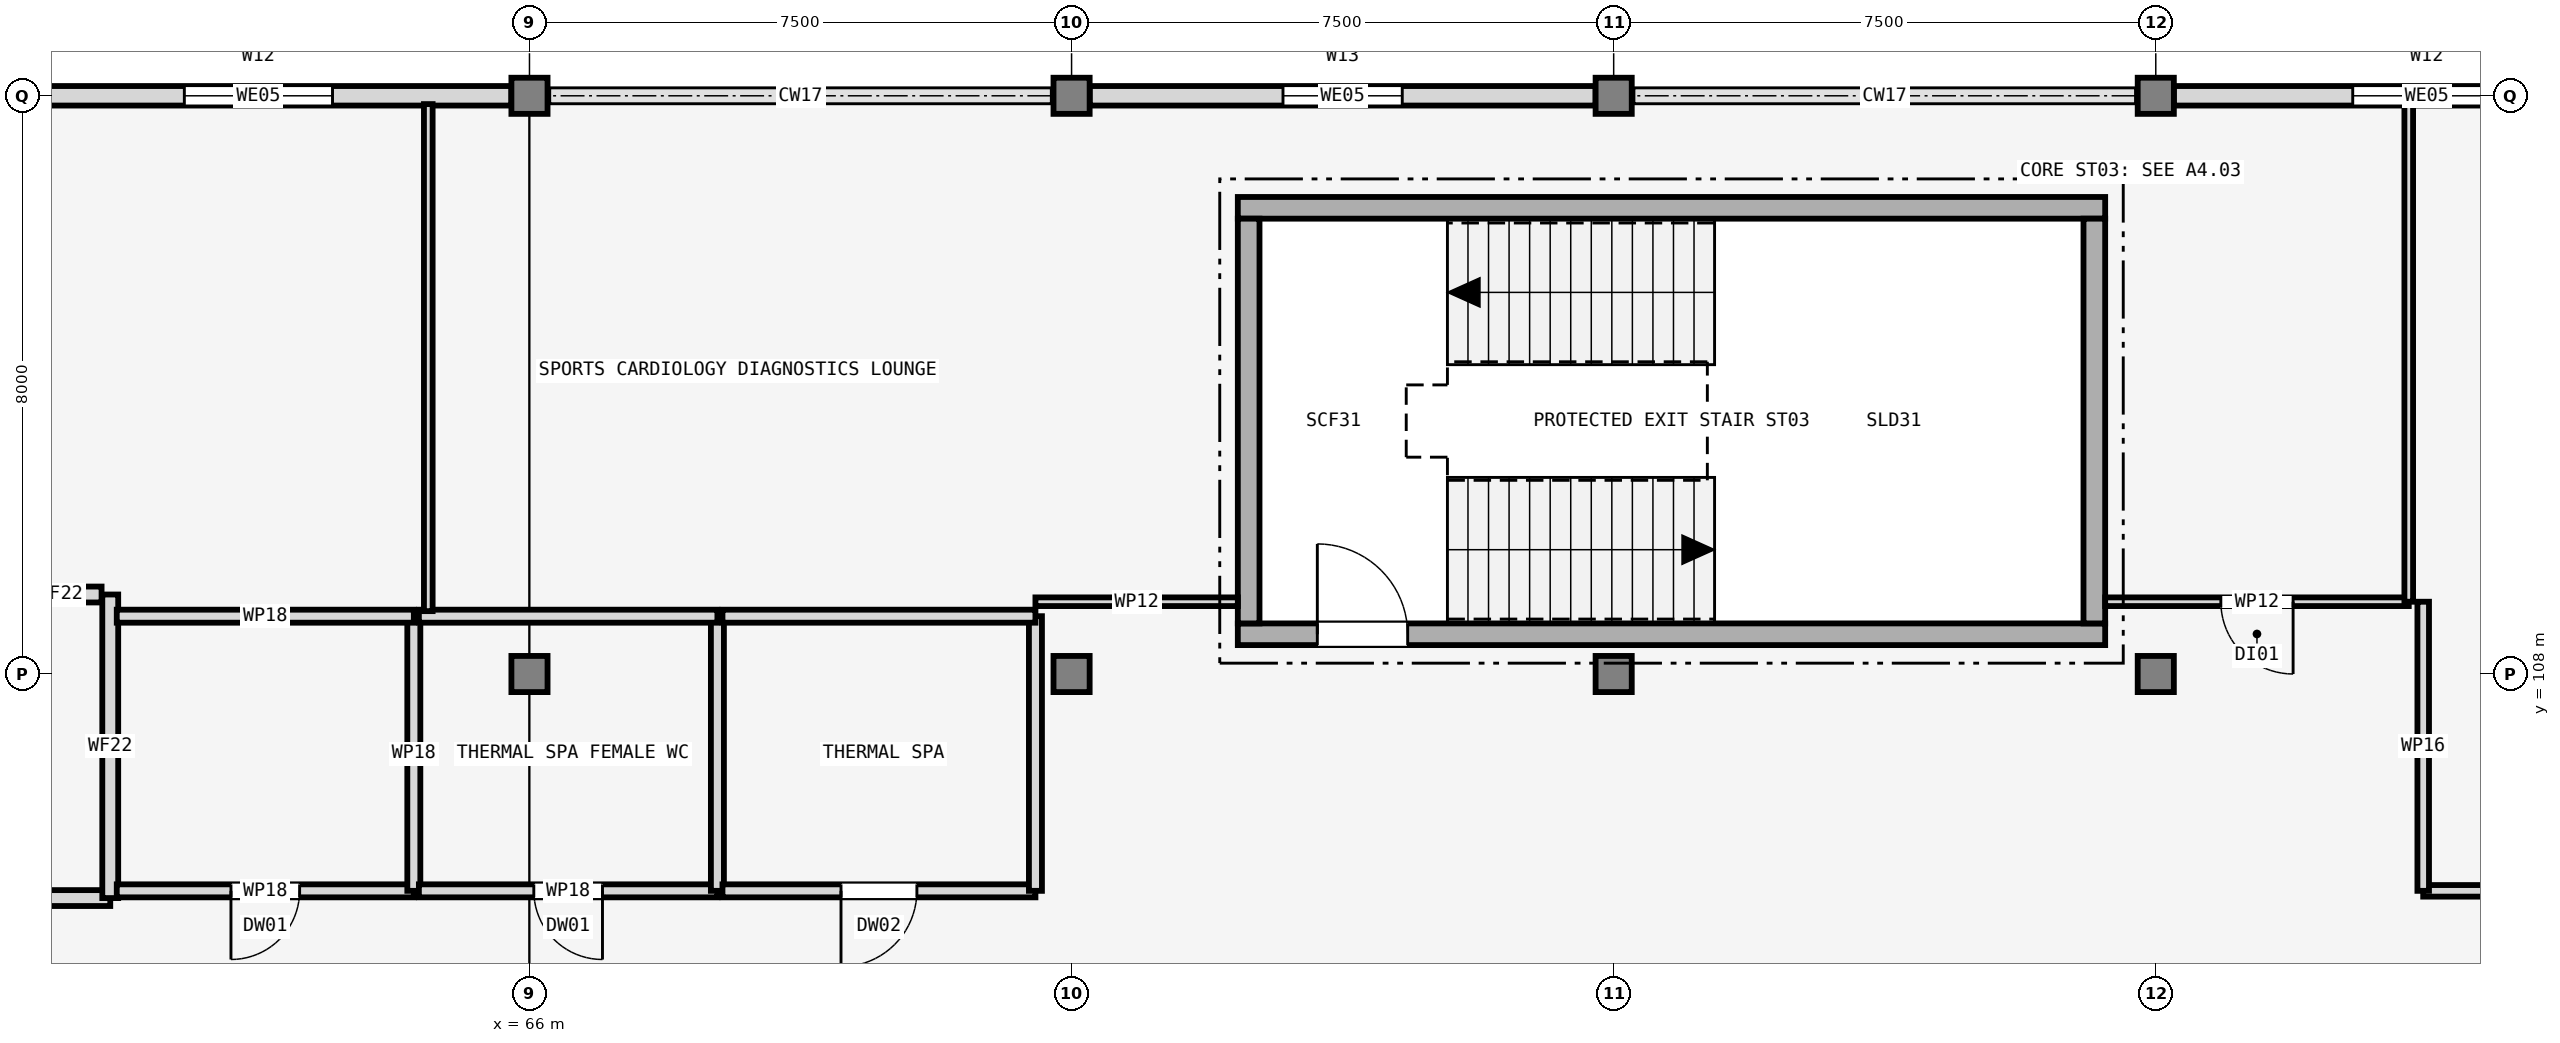
"""IFC4 building model, lengths in metres.
Left out: names, types, materials, properties, quantities, classifications, styles, units other than length and angle.
Written with IfcOpenShell. Run it as: python <this file> out.ifc"""

import sys

from ifc_helpers import new_model, si_unit, direction, frame, frame_2d, origin, origin_2d, place, context, subcontext, project, spatial, rectangle, extrude, element, fill, save


model = new_model("IFC4")
c1 = context("Model", 3, precision=1e-05, world=origin(), true_north=direction((0.0, 1.0)))
c2 = subcontext(c1, "Body", "Model", "MODEL_VIEW")
j1 = project(units=[si_unit("LENGTHUNIT", "METRE"), si_unit("PLANEANGLEUNIT", "RADIAN")], contexts=[c1])
p1 = place(None, origin())
s1 = spatial("IfcSite", under=j1, at=p1, CompositionType="ELEMENT")
p2 = place(p1, origin())
s2 = spatial("IfcBuilding", under=s1, at=p2, CompositionType="ELEMENT")
p3 = place(p2, frame((0.0, 0.0, 13.5)))
s3 = spatial("IfcBuildingStorey", under=s2, at=p3, CompositionType="ELEMENT", Elevation=13.5)
for number, where, z_axis, x_axis in (
    (1, (66.0, 108.0, 0.0), (0.0, 0.0, 1.0), (1.0, 0.0, 0.0)),
    (2, (66.0, 116.0, 0.0), (0.0, 0.0, 1.0), (1.0, 0.0, 0.0)),
    (3, (73.5, 108.0, 0.0), (0.0, 0.0, 1.0), (1.0, 0.0, 0.0)),
    (4, (73.5, 116.0, 0.0), (0.0, 0.0, 1.0), (1.0, 0.0, 0.0)),
    (5, (81.0, 108.0, 0.0), (0.0, 0.0, 1.0), (1.0, 0.0, 0.0)),
    (6, (81.0, 116.0, 0.0), (0.0, 0.0, 1.0), (1.0, 0.0, 0.0)),
    (7, (88.5, 108.0, 0.0), (0.0, 0.0, 1.0), (1.0, 0.0, 0.0)),
    (8, (88.5, 116.0, 0.0), (0.0, 0.0, 1.0), (1.0, 0.0, 0.0)),
):
    element("IfcColumn", number, at=place(p3, frame(where, z_axis=z_axis, x_axis=x_axis)), inside=s3, PredefinedType="COLUMN", context=c2, shape_type="SweptSolid", body=[
        extrude(rectangle(XDim=0.5, YDim=0.5, at=origin_2d()), origin(), (0.0, 0.0, 1.0), 4.2),
    ])
p4 = place(p3, frame((65.75, 116.0, 0.0), z_axis=(0.0, 0.0, 1.0), x_axis=(-1.0, 0.0, 0.0)))
e9 = element("IfcWall", 9, at=p4, inside=s3, PredefinedType="SOLIDWALL", context=c2, shape_type="SweptSolid", body=[
    extrude(rectangle(XDim=7.0, YDim=0.27, at=frame_2d((3.5, 0.0))), origin(), (0.0, 0.0, 1.0), 3.44),
])
p5 = place(p4, frame((2.475, 0.0, 0.95)))
e10 = element("IfcOpeningElement", 10, at=p5, cuts=e9, PredefinedType="OPENING", context=c2, shape_type="SweptSolid", body=[
    extrude(rectangle(XDim=2.05, YDim=1.4, at=frame_2d((1.025, 0.7))), frame((0.0, 0.145, 0.0), z_axis=(0.0, -1.0, 0.0), x_axis=(1.0, 0.0, 0.0)), (0.0, 0.0, 1.0), 0.29),
])
p6 = place(p3, frame((80.75, 116.0, 0.0), z_axis=(0.0, 0.0, 1.0), x_axis=(-1.0, 0.0, 0.0)))
e11 = element("IfcWall", 11, at=p6, inside=s3, PredefinedType="SOLIDWALL", context=c2, shape_type="SweptSolid", body=[
    extrude(rectangle(XDim=7.0, YDim=0.27, at=frame_2d((3.5, 0.0))), origin(), (0.0, 0.0, 1.0), 3.43),
])
p7 = place(p6, frame((2.675, 0.0, 0.95)))
e12 = element("IfcOpeningElement", 12, at=p7, cuts=e11, PredefinedType="OPENING", context=c2, shape_type="SweptSolid", body=[
    extrude(rectangle(XDim=1.65, YDim=1.35, at=frame_2d((0.825, 0.675))), frame((0.0, 0.145, 0.0), z_axis=(0.0, -1.0, 0.0), x_axis=(1.0, 0.0, 0.0)), (0.0, 0.0, 1.0), 0.29),
])
p8 = place(p3, frame((95.75, 116.0, 0.0), z_axis=(0.0, 0.0, 1.0), x_axis=(-1.0, 0.0, 0.0)))
e13 = element("IfcWall", 13, at=p8, inside=s3, PredefinedType="SOLIDWALL", context=c2, shape_type="SweptSolid", body=[
    extrude(rectangle(XDim=7.0, YDim=0.27, at=frame_2d((3.5, 0.0))), origin(), (0.0, 0.0, 1.0), 3.43),
])
p9 = place(p8, frame((2.475, 0.0, 0.95)))
e14 = element("IfcOpeningElement", 14, at=p9, cuts=e13, PredefinedType="OPENING", context=c2, shape_type="SweptSolid", body=[
    extrude(rectangle(XDim=2.05, YDim=1.4, at=frame_2d((1.025, 0.7))), frame((0.0, 0.145, 0.0), z_axis=(0.0, -1.0, 0.0), x_axis=(1.0, 0.0, 0.0)), (0.0, 0.0, 1.0), 0.29),
])
p10 = place(p3, frame((75.8, 108.55, 0.0), z_axis=(0.0, 0.0, 1.0), x_axis=(1.0, 0.0, 0.0)))
e15 = element("IfcWall", 15, at=p10, inside=s3, PredefinedType="SHEAR", context=c2, shape_type="SweptSolid", body=[
    extrude(rectangle(XDim=12.0, YDim=0.3, at=frame_2d((6.0, 0.0))), origin(), (0.0, 0.0, 1.0), 4.2),
])
p11 = place(p10, frame((1.1, 0.0, 0.0)))
e16 = element("IfcOpeningElement", 16, at=p11, cuts=e15, PredefinedType="OPENING", context=c2, shape_type="SweptSolid", body=[
    extrude(rectangle(XDim=1.25, YDim=2.15, at=frame_2d((0.625, 1.075))), frame((0.0, 0.16, 0.0), z_axis=(0.0, -1.0, 0.0), x_axis=(1.0, 0.0, 0.0)), (0.0, 0.0, 1.0), 0.32),
])
p12 = place(p3, frame((87.8, 114.45, 0.0), z_axis=(0.0, 0.0, 1.0), x_axis=(-1.0, 0.0, 0.0)))
e17 = element("IfcWall", 17, at=p12, inside=s3, PredefinedType="SHEAR", context=c2, shape_type="SweptSolid", body=[
    extrude(rectangle(XDim=12.0, YDim=0.3, at=frame_2d((6.0, 0.0))), origin(), (0.0, 0.0, 1.0), 4.2),
])
for number, where, z_axis, x_axis in (
    (18, (75.95, 114.3, 0.0), (0.0, 0.0, 1.0), (0.0, -1.0, 0.0)),
    (19, (87.65, 108.7, 0.0), (0.0, 0.0, 1.0), (0.0, 1.0, 0.0)),
):
    element("IfcWall", number, at=place(p3, frame(where, z_axis=z_axis, x_axis=x_axis)), inside=s3, PredefinedType="SHEAR", context=c2, shape_type="SweptSolid", body=[
        extrude(rectangle(XDim=5.6, YDim=0.3, at=frame_2d((2.8, 0.0))), origin(), (0.0, 0.0, 1.0), 4.2),
    ])
p13 = place(p3, frame((55.92, 104.9, 0.0), z_axis=(0.0, 0.0, 1.0), x_axis=(1.0, 0.0, 0.0)))
e20 = element("IfcWall", 20, at=p13, inside=s3, PredefinedType="SOLIDWALL", context=c2, shape_type="SweptSolid", body=[
    extrude(rectangle(XDim=4.28, YDim=0.22, at=frame_2d((2.14, 0.0))), origin(), (0.0, 0.0, 1.0), 3.12),
])
p14 = place(p13, frame((1.24, 0.0, 0.0)))
e21 = element("IfcOpeningElement", 21, at=p14, cuts=e20, PredefinedType="OPENING", context=c2, shape_type="SweptSolid", body=[
    extrude(rectangle(XDim=1.8, YDim=2.2, at=frame_2d((0.9, 1.1))), frame((0.0, 0.12, 0.0), z_axis=(0.0, -1.0, 0.0), x_axis=(1.0, 0.0, 0.0)), (0.0, 0.0, 1.0), 0.24),
])
p15 = place(p3, frame((60.2, 104.9, 0.0), z_axis=(0.0, 0.0, 1.0), x_axis=(0.0, 1.0, 0.0)))
e22 = element("IfcWall", 22, at=p15, inside=s3, PredefinedType="SOLIDWALL", context=c2, shape_type="SweptSolid", body=[
    extrude(rectangle(XDim=4.2, YDim=0.22, at=frame_2d((2.1, 0.0))), origin(), (0.0, 0.0, 1.0), 3.12),
])
p16 = place(p3, frame((58.95, 109.1, 0.0), z_axis=(0.0, 0.0, 1.0), x_axis=(1.0, 0.0, 0.0)))
e23 = element("IfcWall", 23, at=p16, inside=s3, PredefinedType="SOLIDWALL", context=c2, shape_type="SweptSolid", body=[
    extrude(rectangle(XDim=1.13, YDim=0.22, at=frame_2d((0.565, 0.0))), origin(), (0.0, 0.0, 1.0), 3.12),
])
p17 = place(p3, frame((64.4, 105.0, 0.0), z_axis=(0.0, 0.0, 1.0), x_axis=(-1.0, 0.0, 0.0)))
e24 = element("IfcWall", 24, at=p17, inside=s3, PredefinedType="PARTITIONING", context=c2, shape_type="SweptSolid", body=[
    extrude(rectangle(XDim=4.11, YDim=0.18, at=frame_2d((2.055, 0.0))), origin(), (0.0, 0.0, 1.0), 3.12),
])
p18 = place(p17, frame((1.58, 0.0, 0.0)))
e25 = element("IfcOpeningElement", 25, at=p18, cuts=e24, PredefinedType="OPENING", context=c2, shape_type="SweptSolid", body=[
    extrude(rectangle(XDim=0.95, YDim=2.1, at=frame_2d((0.475, 1.05))), frame((0.0, 0.1, 0.0), z_axis=(0.0, -1.0, 0.0), x_axis=(1.0, 0.0, 0.0)), (0.0, 0.0, 1.0), 0.2),
])
p19 = place(p3, frame((64.4, 108.8, 0.0), z_axis=(0.0, 0.0, 1.0), x_axis=(0.0, -1.0, 0.0)))
e26 = element("IfcWall", 26, at=p19, inside=s3, PredefinedType="PARTITIONING", context=c2, shape_type="SweptSolid", body=[
    extrude(rectangle(XDim=3.8, YDim=0.18, at=frame_2d((1.9, 0.0))), origin(), (0.0, 0.0, 1.0), 3.12),
])
p20 = place(p3, frame((60.29, 108.8, 0.0), z_axis=(0.0, 0.0, 1.0), x_axis=(1.0, 0.0, 0.0)))
e27 = element("IfcWall", 27, at=p20, inside=s3, PredefinedType="PARTITIONING", context=c2, shape_type="SweptSolid", body=[
    extrude(rectangle(XDim=4.11, YDim=0.18, at=frame_2d((2.055, 0.0))), origin(), (0.0, 0.0, 1.0), 3.12),
])
p21 = place(p3, frame((68.6, 105.0, 0.0), z_axis=(0.0, 0.0, 1.0), x_axis=(-1.0, 0.0, 0.0)))
e28 = element("IfcWall", 28, at=p21, inside=s3, PredefinedType="PARTITIONING", context=c2, shape_type="SweptSolid", body=[
    extrude(rectangle(XDim=4.13, YDim=0.18, at=frame_2d((2.065, 0.0))), origin(), (0.0, 0.0, 1.0), 3.12),
])
p22 = place(p21, frame((1.59, 0.0, 0.0)))
e29 = element("IfcOpeningElement", 29, at=p22, cuts=e28, PredefinedType="OPENING", context=c2, shape_type="SweptSolid", body=[
    extrude(rectangle(XDim=0.95, YDim=2.1, at=frame_2d((0.475, 1.05))), frame((0.0, 0.1, 0.0), z_axis=(0.0, -1.0, 0.0), x_axis=(1.0, 0.0, 0.0)), (0.0, 0.0, 1.0), 0.2),
])
p23 = place(p3, frame((68.6, 108.8, 0.0), z_axis=(0.0, 0.0, 1.0), x_axis=(0.0, -1.0, 0.0)))
e30 = element("IfcWall", 30, at=p23, inside=s3, PredefinedType="PARTITIONING", context=c2, shape_type="SweptSolid", body=[
    extrude(rectangle(XDim=3.8, YDim=0.18, at=frame_2d((1.9, 0.0))), origin(), (0.0, 0.0, 1.0), 3.12),
])
p24 = place(p3, frame((64.47, 108.8, 0.0), z_axis=(0.0, 0.0, 1.0), x_axis=(1.0, 0.0, 0.0)))
e31 = element("IfcWall", 31, at=p24, inside=s3, PredefinedType="PARTITIONING", context=c2, shape_type="SweptSolid", body=[
    extrude(rectangle(XDim=4.13, YDim=0.18, at=frame_2d((2.065, 0.0))), origin(), (0.0, 0.0, 1.0), 3.12),
])
p25 = place(p3, frame((73.0, 105.0, 0.0), z_axis=(0.0, 0.0, 1.0), x_axis=(-1.0, 0.0, 0.0)))
e32 = element("IfcWall", 32, at=p25, inside=s3, PredefinedType="PARTITIONING", context=c2, shape_type="SweptSolid", body=[
    extrude(rectangle(XDim=4.33, YDim=0.18, at=frame_2d((2.165, 0.0))), origin(), (0.0, 0.0, 1.0), 3.12),
])
p26 = place(p25, frame((1.64, 0.0, 0.0)))
e33 = element("IfcOpeningElement", 33, at=p26, cuts=e32, PredefinedType="OPENING", context=c2, shape_type="SweptSolid", body=[
    extrude(rectangle(XDim=1.05, YDim=2.1, at=frame_2d((0.525, 1.05))), frame((0.0, 0.1, 0.0), z_axis=(0.0, -1.0, 0.0), x_axis=(1.0, 0.0, 0.0)), (0.0, 0.0, 1.0), 0.2),
])
p27 = place(p3, frame((73.0, 108.8, 0.0), z_axis=(0.0, 0.0, 1.0), x_axis=(0.0, -1.0, 0.0)))
e34 = element("IfcWall", 34, at=p27, inside=s3, PredefinedType="PARTITIONING", context=c2, shape_type="SweptSolid", body=[
    extrude(rectangle(XDim=3.8, YDim=0.18, at=frame_2d((1.9, 0.0))), origin(), (0.0, 0.0, 1.0), 3.12),
])
p28 = place(p3, frame((68.67, 108.8, 0.0), z_axis=(0.0, 0.0, 1.0), x_axis=(1.0, 0.0, 0.0)))
e35 = element("IfcWall", 35, at=p28, inside=s3, PredefinedType="PARTITIONING", context=c2, shape_type="SweptSolid", body=[
    extrude(rectangle(XDim=4.33, YDim=0.18, at=frame_2d((2.165, 0.0))), origin(), (0.0, 0.0, 1.0), 3.12),
])
p29 = place(p3, frame((92.0, 109.0, 0.0), z_axis=(0.0, 0.0, 1.0), x_axis=(-1.0, 0.0, 0.0)))
e36 = element("IfcWall", 36, at=p29, inside=s3, PredefinedType="PARTITIONING", context=c2, shape_type="SweptSolid", body=[
    extrude(rectangle(XDim=4.2, YDim=0.12, at=frame_2d((2.1, 0.0))), origin(), (0.0, 0.0, 1.0), 3.12),
])
p30 = place(p29, frame((1.6, 0.0, 0.0)))
e37 = element("IfcOpeningElement", 37, at=p30, cuts=e36, PredefinedType="OPENING", context=c2, shape_type="SweptSolid", body=[
    extrude(rectangle(XDim=1.0, YDim=2.1, at=frame_2d((0.5, 1.05))), frame((0.0, 0.07, 0.0), z_axis=(0.0, -1.0, 0.0), x_axis=(1.0, 0.0, 0.0)), (0.0, 0.0, 1.0), 0.14),
])
p31 = place(p3, frame((75.8, 109.0, 0.0), z_axis=(0.0, 0.0, 1.0), x_axis=(-1.0, 0.0, 0.0)))
e38 = element("IfcWall", 38, at=p31, inside=s3, PredefinedType="PARTITIONING", context=c2, shape_type="SweptSolid", body=[
    extrude(rectangle(XDim=2.8, YDim=0.12, at=frame_2d((1.4, 0.0))), origin(), (0.0, 0.0, 1.0), 3.12),
])
p32 = place(p3, frame((64.6, 108.87, 0.0), z_axis=(0.0, 0.0, 1.0), x_axis=(0.0, 1.0, 0.0)))
e39 = element("IfcWall", 39, at=p32, inside=s3, PredefinedType="PARTITIONING", context=c2, shape_type="SweptSolid", body=[
    extrude(rectangle(XDim=7.015, YDim=0.12, at=frame_2d((3.507, 0.0))), origin(), (0.0, 0.0, 1.0), 3.12),
])
p33 = place(p3, frame((92.0, 115.885, 0.0), z_axis=(0.0, 0.0, 1.0), x_axis=(0.0, -1.0, 0.0)))
e40 = element("IfcWall", 40, at=p33, inside=s3, PredefinedType="PARTITIONING", context=c2, shape_type="SweptSolid", body=[
    extrude(rectangle(XDim=6.885, YDim=0.12, at=frame_2d((3.442, 0.0))), origin(), (0.0, 0.0, 1.0), 3.12),
])
p34 = place(p3, frame((110.095, 105.0, 0.0), z_axis=(0.0, 0.0, 1.0), x_axis=(-1.0, 0.0, 0.0)))
e41 = element("IfcWall", 41, at=p34, inside=s3, PredefinedType="PARTITIONING", context=c2, shape_type="SweptSolid", body=[
    extrude(rectangle(XDim=17.896, YDim=0.16, at=frame_2d((8.948, 0.0))), origin(), (0.0, 0.0, 1.0), 3.12),
])
p35 = place(p34, frame((8.148, 0.0, 0.0)))
e42 = element("IfcOpeningElement", 42, at=p35, cuts=e41, PredefinedType="OPENING", context=c2, shape_type="SweptSolid", body=[
    extrude(rectangle(XDim=1.6, YDim=2.2, at=frame_2d((0.8, 1.1))), frame((0.0, 0.09, 0.0), z_axis=(0.0, -1.0, 0.0), x_axis=(1.0, 0.0, 0.0)), (0.0, 0.0, 1.0), 0.18),
])
p36 = place(p3, frame((92.2, 105.0, 0.0), z_axis=(0.0, 0.0, 1.0), x_axis=(0.0, 1.0, 0.0)))
e43 = element("IfcWall", 43, at=p36, inside=s3, PredefinedType="PARTITIONING", context=c2, shape_type="SweptSolid", body=[
    extrude(rectangle(XDim=4.0, YDim=0.16, at=frame_2d((2.0, 0.0))), origin(), (0.0, 0.0, 1.0), 3.12),
])
p37 = place(p5, origin())
e44 = element("IfcWindow", 44, at=p37, inside=s3, PartitioningType="SINGLE_PANEL", PredefinedType="WINDOW", context=c2, shape_type="SweptSolid", body=[
    extrude(rectangle(XDim=2.05, YDim=1.4, at=frame_2d((1.025, 0.7))), frame((0.0, 0.03, 0.0), z_axis=(0.0, -1.0, 0.0), x_axis=(1.0, 0.0, 0.0)), (0.0, 0.0, 1.0), 0.06),
])
fill(e10, e44)
p38 = place(p7, origin())
e45 = element("IfcWindow", 45, at=p38, inside=s3, PartitioningType="SINGLE_PANEL", PredefinedType="WINDOW", context=c2, shape_type="SweptSolid", body=[
    extrude(rectangle(XDim=1.65, YDim=1.35, at=frame_2d((0.825, 0.675))), frame((0.0, 0.03, 0.0), z_axis=(0.0, -1.0, 0.0), x_axis=(1.0, 0.0, 0.0)), (0.0, 0.0, 1.0), 0.06),
])
fill(e12, e45)
p39 = place(p9, origin())
e46 = element("IfcWindow", 46, at=p39, inside=s3, PartitioningType="SINGLE_PANEL", PredefinedType="WINDOW", context=c2, shape_type="SweptSolid", body=[
    extrude(rectangle(XDim=2.05, YDim=1.4, at=frame_2d((1.025, 0.7))), frame((0.0, 0.03, 0.0), z_axis=(0.0, -1.0, 0.0), x_axis=(1.0, 0.0, 0.0)), (0.0, 0.0, 1.0), 0.06),
])
fill(e14, e46)
p40 = place(p11, origin())
e47 = element("IfcDoor", 47, at=p40, inside=s3, OperationType="SINGLE_SWING_LEFT", PredefinedType="DOOR", context=c2, shape_type="SweptSolid", body=[
    extrude(rectangle(XDim=1.25, YDim=2.15, at=frame_2d((0.625, 1.075))), frame((0.0, 0.025, 0.0), z_axis=(0.0, -1.0, 0.0), x_axis=(1.0, 0.0, 0.0)), (0.0, 0.0, 1.0), 0.05),
])
fill(e16, e47)
p41 = place(p18, origin())
e48 = element("IfcDoor", 48, at=p41, inside=s3, OperationType="SINGLE_SWING_RIGHT", PredefinedType="DOOR", context=c2, shape_type="SweptSolid", body=[
    extrude(rectangle(XDim=0.95, YDim=2.1, at=frame_2d((0.475, 1.05))), frame((0.0, 0.025, 0.0), z_axis=(0.0, -1.0, 0.0), x_axis=(1.0, 0.0, 0.0)), (0.0, 0.0, 1.0), 0.05),
])
fill(e25, e48)
p42 = place(p22, origin())
e49 = element("IfcDoor", 49, at=p42, inside=s3, OperationType="SINGLE_SWING_LEFT", PredefinedType="DOOR", context=c2, shape_type="SweptSolid", body=[
    extrude(rectangle(XDim=0.95, YDim=2.1, at=frame_2d((0.475, 1.05))), frame((0.0, 0.025, 0.0), z_axis=(0.0, -1.0, 0.0), x_axis=(1.0, 0.0, 0.0)), (0.0, 0.0, 1.0), 0.05),
])
fill(e29, e49)
p43 = place(p26, origin())
e50 = element("IfcDoor", 50, at=p43, inside=s3, OperationType="SINGLE_SWING_RIGHT", PredefinedType="DOOR", context=c2, shape_type="SweptSolid", body=[
    extrude(rectangle(XDim=1.05, YDim=2.1, at=frame_2d((0.525, 1.05))), frame((0.0, 0.025, 0.0), z_axis=(0.0, -1.0, 0.0), x_axis=(1.0, 0.0, 0.0)), (0.0, 0.0, 1.0), 0.05),
])
fill(e33, e50)
p44 = place(p30, origin())
e51 = element("IfcDoor", 51, at=p44, inside=s3, OperationType="SINGLE_SWING_LEFT", PredefinedType="DOOR", context=c2, shape_type="SweptSolid", body=[
    extrude(rectangle(XDim=1.0, YDim=2.1, at=frame_2d((0.5, 1.05))), frame((0.0, 0.025, 0.0), z_axis=(0.0, -1.0, 0.0), x_axis=(1.0, 0.0, 0.0)), (0.0, 0.0, 1.0), 0.05),
])
fill(e37, e51)
save(model, sys.argv[1])
